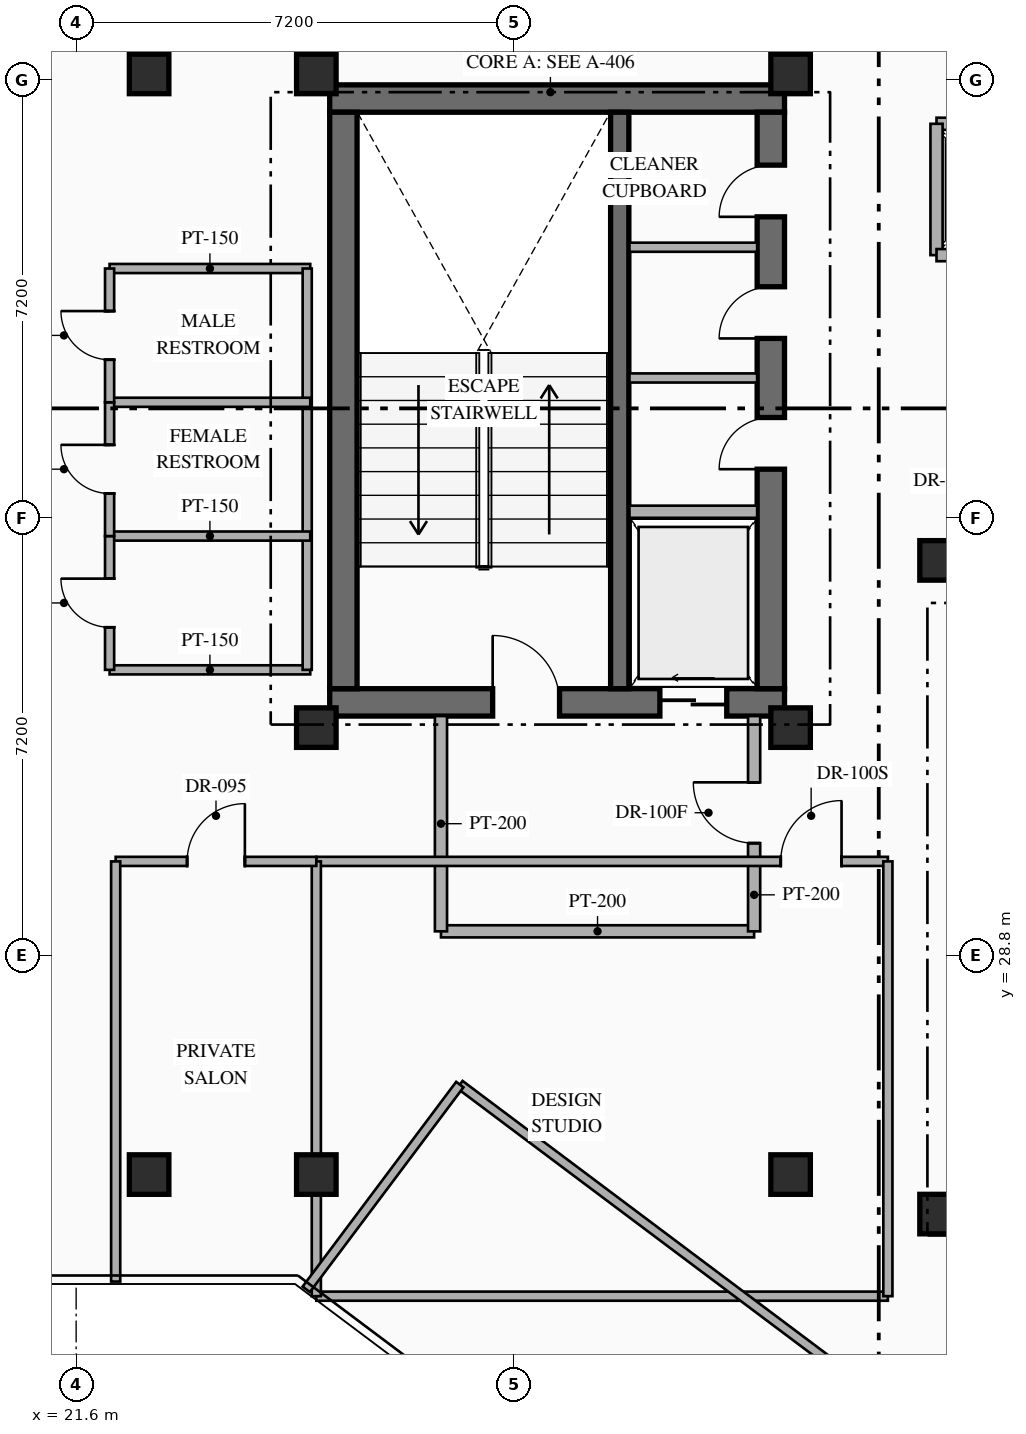
"""IFC4 building model, lengths in metres.
Left out: names, types, materials, properties, quantities, classifications, styles, units other than length and angle.
Written with IfcOpenShell. Run it as: python <this file> out.ifc"""

import sys

from ifc_helpers import new_model, si_unit, direction, frame, frame_2d, origin, origin_2d, place, context, subcontext, project, spatial, rectangle, hollow_rectangle, extrude, element, fill, save


model = new_model("IFC4")
c1 = context("Model", 3, precision=1e-05, world=origin(), true_north=direction((0.0, 1.0)))
c2 = subcontext(c1, "Body", "Model", "MODEL_VIEW")
j1 = project(units=[si_unit("LENGTHUNIT", "METRE"), si_unit("PLANEANGLEUNIT", "RADIAN")], contexts=[c1])
p1 = place(None, origin())
s1 = spatial("IfcSite", under=j1, at=p1, CompositionType="ELEMENT")
p2 = place(p1, origin())
s2 = spatial("IfcBuilding", under=s1, at=p2, CompositionType="ELEMENT")
p3 = place(p2, frame((0.0, 0.0, 250.35)))
s3 = spatial("IfcBuildingStorey", under=s2, at=p3, CompositionType="ELEMENT", Elevation=250.35)
p4 = place(p3, frame((25.77, 32.965, 0.0), z_axis=(0.0, 0.0, 1.0), x_axis=(1.0, 0.0, 0.0)))
e1 = element("IfcWall", 1, at=p4, inside=s3, PredefinedType="SHEAR", context=c2, shape_type="SweptSolid", body=[
    extrude(rectangle(XDim=7.48, YDim=0.45, at=frame_2d((3.74, 0.0))), origin(), (0.0, 0.0, 1.0), 3.6),
])
p5 = place(p4, frame((2.68, 0.0, 0.0)))
e2 = element("IfcOpeningElement", 2, at=p5, cuts=e1, PredefinedType="OPENING", context=c2, shape_type="SweptSolid", body=[
    extrude(rectangle(XDim=1.1, YDim=2.2, at=frame_2d((0.55, 1.1))), frame((0.0, 0.235, 0.0), z_axis=(0.0, -1.0, 0.0), x_axis=(1.0, 0.0, 0.0)), (0.0, 0.0, 1.0), 0.47),
])
p6 = place(p4, frame((5.43, 0.0, 0.0)))
e3 = element("IfcOpeningElement", 3, at=p6, cuts=e1, PredefinedType="OPENING", context=c2, shape_type="SweptSolid", body=[
    extrude(rectangle(XDim=1.1, YDim=2.15, at=frame_2d((0.55, 1.075))), frame((0.0, 0.235, 0.0), z_axis=(0.0, -1.0, 0.0), x_axis=(1.0, 0.0, 0.0)), (0.0, 0.0, 1.0), 0.47),
])
p7 = place(p3, frame((25.77, 42.895, 0.0), z_axis=(0.0, 0.0, 1.0), x_axis=(1.0, 0.0, 0.0)))
e4 = element("IfcWall", 4, at=p7, inside=s3, PredefinedType="SHEAR", context=c2, shape_type="SweptSolid", body=[
    extrude(rectangle(XDim=7.48, YDim=0.45, at=frame_2d((3.74, 0.0))), origin(), (0.0, 0.0, 1.0), 3.6),
])
p8 = place(p3, frame((25.995, 33.19, 0.0), z_axis=(0.0, 0.0, 1.0), x_axis=(0.0, 1.0, 0.0)))
e5 = element("IfcWall", 5, at=p8, inside=s3, PredefinedType="SHEAR", context=c2, shape_type="SweptSolid", body=[
    extrude(rectangle(XDim=9.48, YDim=0.45, at=frame_2d((4.74, 0.0))), origin(), (0.0, 0.0, 1.0), 3.6),
])
p9 = place(p3, frame((33.025, 33.19, 0.0), z_axis=(0.0, 0.0, 1.0), x_axis=(0.0, 1.0, 0.0)))
e6 = element("IfcWall", 6, at=p9, inside=s3, PredefinedType="SHEAR", context=c2, shape_type="SweptSolid", body=[
    extrude(rectangle(XDim=9.48, YDim=0.45, at=frame_2d((4.74, 0.0))), origin(), (0.0, 0.0, 1.0), 3.6),
])
p10 = place(p9, frame((3.61, 0.0, 0.0)))
e7 = element("IfcOpeningElement", 7, at=p10, cuts=e6, PredefinedType="OPENING", context=c2, shape_type="SweptSolid", body=[
    extrude(rectangle(XDim=0.85, YDim=2.08, at=frame_2d((0.425, 1.04))), frame((0.0, 0.235, 0.0), z_axis=(0.0, -1.0, 0.0), x_axis=(1.0, 0.0, 0.0)), (0.0, 0.0, 1.0), 0.47),
])
p11 = place(p9, frame((5.76, 0.0, 0.0)))
e8 = element("IfcOpeningElement", 8, at=p11, cuts=e6, PredefinedType="OPENING", context=c2, shape_type="SweptSolid", body=[
    extrude(rectangle(XDim=0.85, YDim=2.08, at=frame_2d((0.425, 1.04))), frame((0.0, 0.235, 0.0), z_axis=(0.0, -1.0, 0.0), x_axis=(1.0, 0.0, 0.0)), (0.0, 0.0, 1.0), 0.47),
])
p12 = place(p9, frame((7.76, 0.0, 0.0)))
e9 = element("IfcOpeningElement", 9, at=p12, cuts=e6, PredefinedType="OPENING", context=c2, shape_type="SweptSolid", body=[
    extrude(rectangle(XDim=0.85, YDim=2.08, at=frame_2d((0.425, 1.04))), frame((0.0, 0.235, 0.0), z_axis=(0.0, -1.0, 0.0), x_axis=(1.0, 0.0, 0.0)), (0.0, 0.0, 1.0), 0.47),
])
p13 = place(p3, frame((30.54, 33.19, 0.0), z_axis=(0.0, 0.0, 1.0), x_axis=(0.0, 1.0, 0.0)))
e10 = element("IfcWall", 10, at=p13, inside=s3, PredefinedType="SHEAR", context=c2, shape_type="SweptSolid", body=[
    extrude(rectangle(XDim=9.48, YDim=0.3, at=frame_2d((4.74, 0.0))), origin(), (0.0, 0.0, 1.0), 3.6),
])
for number, where, z_axis, x_axis in (
    (11, (25.55, 32.55, 0.0), (0.0, 0.0, 1.0), (1.0, 0.0, 0.0)),
    (12, (33.35, 32.55, 0.0), (0.0, 0.0, 1.0), (1.0, 0.0, 0.0)),
    (13, (25.55, 43.3, 0.0), (0.0, 0.0, 1.0), (1.0, 0.0, 0.0)),
    (14, (33.35, 43.3, 0.0), (0.0, 0.0, 1.0), (1.0, 0.0, 0.0)),
    (15, (35.8, 24.55, 0.0), (0.0, 0.0, 1.0), (1.0, 0.0, 0.0)),
    (16, (35.8, 35.3, 0.0), (0.0, 0.0, 1.0), (1.0, 0.0, 0.0)),
    (17, (25.55, 25.2, 0.0), (0.0, 0.0, 1.0), (1.0, 0.0, 0.0)),
    (18, (33.35, 25.2, 0.0), (0.0, 0.0, 1.0), (1.0, 0.0, 0.0)),
    (19, (22.8, 25.2, 0.0), (0.0, 0.0, 1.0), (1.0, 0.0, 0.0)),
    (20, (22.8, 43.3, 0.0), (0.0, 0.0, 1.0), (1.0, 0.0, 0.0)),
):
    element("IfcColumn", number, at=place(p3, frame(where, z_axis=z_axis, x_axis=x_axis)), inside=s3, PredefinedType="COLUMN", context=c2, shape_type="SweptSolid", body=[
        extrude(hollow_rectangle(XDim=0.65, YDim=0.65, WallThickness=0.025, at=origin_2d()), origin(), (0.0, 0.0, 1.0), 3.6),
    ])
p14 = place(p3, frame((30.7, 36.1, 0.0), z_axis=(0.0, 0.0, 1.0), x_axis=(1.0, 0.0, 0.0)))
e21 = element("IfcWall", 21, at=p14, inside=s3, PredefinedType="STANDARD", context=c2, shape_type="SweptSolid", body=[
    extrude(rectangle(XDim=2.1, YDim=0.2, at=frame_2d((1.05, 0.0))), origin(), (0.0, 0.0, 1.0), 3.35),
])
for number, where, z_axis, x_axis in (
    (22, (30.7, 38.3, 0.0), (0.0, 0.0, 1.0), (1.0, 0.0, 0.0)),
    (23, (30.7, 40.45, 0.0), (0.0, 0.0, 1.0), (1.0, 0.0, 0.0)),
):
    element("IfcWall", number, at=place(p3, frame(where, z_axis=z_axis, x_axis=x_axis)), inside=s3, PredefinedType="PARTITIONING", context=c2, shape_type="SweptSolid", body=[
        extrude(rectangle(XDim=2.1, YDim=0.15, at=frame_2d((1.05, 0.0))), origin(), (0.0, 0.0, 1.0), 3.35),
    ])
p15 = place(p3, frame((27.6, 29.2, 0.0), z_axis=(0.0, 0.0, 1.0), x_axis=(1.0, 0.0, 0.0)))
e24 = element("IfcWall", 24, at=p15, inside=s3, PredefinedType="STANDARD", context=c2, shape_type="SweptSolid", body=[
    extrude(rectangle(XDim=5.15, YDim=0.2, at=frame_2d((2.575, 0.0))), origin(), (0.0, 0.0, 1.0), 3.35),
])
p16 = place(p3, frame((27.6, 29.2, 0.0), z_axis=(0.0, 0.0, 1.0), x_axis=(0.0, 1.0, 0.0)))
e25 = element("IfcWall", 25, at=p16, inside=s3, PredefinedType="STANDARD", context=c2, shape_type="SweptSolid", body=[
    extrude(rectangle(XDim=3.54, YDim=0.2, at=frame_2d((1.77, 0.0))), origin(), (0.0, 0.0, 1.0), 3.35),
])
p17 = place(p3, frame((32.75, 29.2, 0.0), z_axis=(0.0, 0.0, 1.0), x_axis=(0.0, 1.0, 0.0)))
e26 = element("IfcWall", 26, at=p17, inside=s3, PredefinedType="STANDARD", context=c2, shape_type="SweptSolid", body=[
    extrude(rectangle(XDim=3.54, YDim=0.2, at=frame_2d((1.77, 0.0))), origin(), (0.0, 0.0, 1.0), 3.35),
])
p18 = place(p17, frame((1.45, 0.0, 0.0)))
e27 = element("IfcOpeningElement", 27, at=p18, cuts=e26, PredefinedType="OPENING", context=c2, shape_type="SweptSolid", body=[
    extrude(rectangle(XDim=1.0, YDim=2.2, at=frame_2d((0.5, 1.1))), frame((0.0, 0.11, 0.0), z_axis=(0.0, -1.0, 0.0), x_axis=(1.0, 0.0, 0.0)), (0.0, 0.0, 1.0), 0.22),
])
p19 = place(p3, frame((35.75, 42.48, 0.0), z_axis=(0.0, 0.0, 1.0), x_axis=(1.0, 0.0, 0.0)))
e28 = element("IfcWall", 28, at=p19, inside=s3, PredefinedType="STANDARD", context=c2, shape_type="SweptSolid", body=[
    extrude(rectangle(XDim=9.11, YDim=0.2, at=frame_2d((4.555, 0.0))), origin(), (0.0, 0.0, 1.0), 3.35),
])
p20 = place(p3, frame((35.75, 40.32, 0.0), z_axis=(0.0, 0.0, 1.0), x_axis=(0.0, 1.0, 0.0)))
e29 = element("IfcWall", 29, at=p20, inside=s3, PredefinedType="STANDARD", context=c2, shape_type="SweptSolid", body=[
    extrude(rectangle(XDim=2.16, YDim=0.2, at=frame_2d((1.08, 0.0))), origin(), (0.0, 0.0, 1.0), 3.35),
])
p21 = place(p3, frame((35.75, 40.32, 0.0), z_axis=(0.0, 0.0, 1.0), x_axis=(1.0, 0.0, 0.0)))
e30 = element("IfcWall", 30, at=p21, inside=s3, PredefinedType="STANDARD", context=c2, shape_type="SweptSolid", body=[
    extrude(rectangle(XDim=9.11, YDim=0.2, at=frame_2d((4.555, 0.0))), origin(), (0.0, 0.0, 1.0), 3.35),
])
p22 = place(p21, frame((0.53, 0.0, 0.0)))
e31 = element("IfcOpeningElement", 31, at=p22, cuts=e30, PredefinedType="OPENING", context=c2, shape_type="SweptSolid", body=[
    extrude(rectangle(XDim=1.1, YDim=2.18, at=frame_2d((0.55, 1.09))), frame((0.0, 0.11, 0.0), z_axis=(0.0, -1.0, 0.0), x_axis=(1.0, 0.0, 0.0)), (0.0, 0.0, 1.0), 0.22),
])
p23 = place(p21, frame((2.73, 0.0, 0.0)))
e32 = element("IfcOpeningElement", 32, at=p23, cuts=e30, PredefinedType="OPENING", context=c2, shape_type="SweptSolid", body=[
    extrude(rectangle(XDim=1.1, YDim=2.18, at=frame_2d((0.55, 1.09))), frame((0.0, 0.11, 0.0), z_axis=(0.0, -1.0, 0.0), x_axis=(1.0, 0.0, 0.0)), (0.0, 0.0, 1.0), 0.22),
])
p24 = place(p21, frame((4.93, 0.0, 0.0)))
e33 = element("IfcOpeningElement", 33, at=p24, cuts=e30, PredefinedType="OPENING", context=c2, shape_type="SweptSolid", body=[
    extrude(rectangle(XDim=1.1, YDim=2.18, at=frame_2d((0.55, 1.09))), frame((0.0, 0.11, 0.0), z_axis=(0.0, -1.0, 0.0), x_axis=(1.0, 0.0, 0.0)), (0.0, 0.0, 1.0), 0.22),
])
p25 = place(p21, frame((7.13, 0.0, 0.0)))
e34 = element("IfcOpeningElement", 34, at=p25, cuts=e30, PredefinedType="OPENING", context=c2, shape_type="SweptSolid", body=[
    extrude(rectangle(XDim=1.1, YDim=2.18, at=frame_2d((0.55, 1.09))), frame((0.0, 0.11, 0.0), z_axis=(0.0, -1.0, 0.0), x_axis=(1.0, 0.0, 0.0)), (0.0, 0.0, 1.0), 0.22),
])
for number, where, z_axis, x_axis in (
    (35, (22.15, 33.5, 0.0), (0.0, 0.0, 1.0), (1.0, 0.0, 0.0)),
    (36, (22.15, 40.1, 0.0), (0.0, 0.0, 1.0), (1.0, 0.0, 0.0)),
):
    element("IfcWall", number, at=place(p3, frame(where, z_axis=z_axis, x_axis=x_axis)), inside=s3, PredefinedType="PARTITIONING", context=c2, shape_type="SweptSolid", body=[
        extrude(rectangle(XDim=3.3, YDim=0.15, at=frame_2d((1.65, 0.0))), origin(), (0.0, 0.0, 1.0), 3.35),
    ])
p26 = place(p3, frame((25.4, 33.5, 0.0), z_axis=(0.0, 0.0, 1.0), x_axis=(0.0, 1.0, 0.0)))
e37 = element("IfcWall", 37, at=p26, inside=s3, PredefinedType="PARTITIONING", context=c2, shape_type="SweptSolid", body=[
    extrude(rectangle(XDim=6.6, YDim=0.15, at=frame_2d((3.3, 0.0))), origin(), (0.0, 0.0, 1.0), 3.35),
])
for number, where, z_axis, x_axis in (
    (38, (22.15, 35.7, 0.0), (0.0, 0.0, 1.0), (1.0, 0.0, 0.0)),
    (39, (22.15, 37.9, 0.0), (0.0, 0.0, 1.0), (1.0, 0.0, 0.0)),
):
    element("IfcWall", number, at=place(p3, frame(where, z_axis=z_axis, x_axis=x_axis)), inside=s3, PredefinedType="PARTITIONING", context=c2, shape_type="SweptSolid", body=[
        extrude(rectangle(XDim=3.3, YDim=0.15, at=frame_2d((1.65, 0.0))), origin(), (0.0, 0.0, 1.0), 3.35),
    ])
p27 = place(p3, frame((22.15, 33.5, 0.0), z_axis=(0.0, 0.0, 1.0), x_axis=(0.0, 1.0, 0.0)))
e40 = element("IfcWall", 40, at=p27, inside=s3, PredefinedType="PARTITIONING", context=c2, shape_type="SweptSolid", body=[
    extrude(rectangle(XDim=2.2, YDim=0.15, at=frame_2d((1.1, 0.0))), origin(), (0.0, 0.0, 1.0), 3.35),
])
p28 = place(p27, frame((0.7, 0.0, 0.0)))
e41 = element("IfcOpeningElement", 41, at=p28, cuts=e40, PredefinedType="OPENING", context=c2, shape_type="SweptSolid", body=[
    extrude(rectangle(XDim=0.8, YDim=2.06, at=frame_2d((0.4, 1.03))), frame((0.0, 0.085, 0.0), z_axis=(0.0, -1.0, 0.0), x_axis=(1.0, 0.0, 0.0)), (0.0, 0.0, 1.0), 0.17),
])
p29 = place(p3, frame((22.15, 35.7, 0.0), z_axis=(0.0, 0.0, 1.0), x_axis=(0.0, 1.0, 0.0)))
e42 = element("IfcWall", 42, at=p29, inside=s3, PredefinedType="PARTITIONING", context=c2, shape_type="SweptSolid", body=[
    extrude(rectangle(XDim=2.2, YDim=0.15, at=frame_2d((1.1, 0.0))), origin(), (0.0, 0.0, 1.0), 3.35),
])
p30 = place(p29, frame((0.7, 0.0, 0.0)))
e43 = element("IfcOpeningElement", 43, at=p30, cuts=e42, PredefinedType="OPENING", context=c2, shape_type="SweptSolid", body=[
    extrude(rectangle(XDim=0.8, YDim=2.06, at=frame_2d((0.4, 1.03))), frame((0.0, 0.085, 0.0), z_axis=(0.0, -1.0, 0.0), x_axis=(1.0, 0.0, 0.0)), (0.0, 0.0, 1.0), 0.17),
])
p31 = place(p3, frame((22.15, 37.9, 0.0), z_axis=(0.0, 0.0, 1.0), x_axis=(0.0, 1.0, 0.0)))
e44 = element("IfcWall", 44, at=p31, inside=s3, PredefinedType="PARTITIONING", context=c2, shape_type="SweptSolid", body=[
    extrude(rectangle(XDim=2.2, YDim=0.15, at=frame_2d((1.1, 0.0))), origin(), (0.0, 0.0, 1.0), 3.35),
])
p32 = place(p31, frame((0.7, 0.0, 0.0)))
e45 = element("IfcOpeningElement", 45, at=p32, cuts=e44, PredefinedType="OPENING", context=c2, shape_type="SweptSolid", body=[
    extrude(rectangle(XDim=0.8, YDim=2.06, at=frame_2d((0.4, 1.03))), frame((0.0, 0.085, 0.0), z_axis=(0.0, -1.0, 0.0), x_axis=(1.0, 0.0, 0.0)), (0.0, 0.0, 1.0), 0.17),
])
p33 = place(p3, frame((25.55, 23.2, 0.0), z_axis=(0.0, 0.0, 1.0), x_axis=(1.0, 0.0, 0.0)))
e46 = element("IfcWall", 46, at=p33, inside=s3, PredefinedType="PARTITIONING", context=c2, shape_type="SweptSolid", body=[
    extrude(rectangle(XDim=9.4, YDim=0.15, at=frame_2d((4.7, 0.0))), origin(), (0.0, 0.0, 1.0), 3.35),
])
p34 = place(p3, frame((25.55, 30.35, 0.0), z_axis=(0.0, 0.0, 1.0), x_axis=(1.0, 0.0, 0.0)))
e47 = element("IfcWall", 47, at=p34, inside=s3, PredefinedType="PARTITIONING", context=c2, shape_type="SweptSolid", body=[
    extrude(rectangle(XDim=9.4, YDim=0.15, at=frame_2d((4.7, 0.0))), origin(), (0.0, 0.0, 1.0), 3.35),
])
p35 = place(p34, frame((7.638, 0.0, 0.0)))
e48 = element("IfcOpeningElement", 48, at=p35, cuts=e47, PredefinedType="OPENING", context=c2, shape_type="SweptSolid", body=[
    extrude(rectangle(XDim=1.0, YDim=2.15, at=frame_2d((0.5, 1.075))), frame((0.0, 0.085, 0.0), z_axis=(0.0, -1.0, 0.0), x_axis=(1.0, 0.0, 0.0)), (0.0, 0.0, 1.0), 0.17),
])
p36 = place(p3, frame((25.55, 23.2, 0.0), z_axis=(0.0, 0.0, 1.0), x_axis=(0.0, 1.0, 0.0)))
e49 = element("IfcWall", 49, at=p36, inside=s3, PredefinedType="PARTITIONING", context=c2, shape_type="SweptSolid", body=[
    extrude(rectangle(XDim=7.15, YDim=0.15, at=frame_2d((3.575, 0.0))), origin(), (0.0, 0.0, 1.0), 2.757),
])
p37 = place(p3, frame((34.95, 23.2, 0.0), z_axis=(0.0, 0.0, 1.0), x_axis=(0.0, 1.0, 0.0)))
e50 = element("IfcWall", 50, at=p37, inside=s3, PredefinedType="PARTITIONING", context=c2, shape_type="SweptSolid", body=[
    extrude(rectangle(XDim=7.15, YDim=0.15, at=frame_2d((3.575, 0.0))), origin(), (0.0, 0.0, 1.0), 3.35),
])
p38 = place(p3, frame((22.25, 30.35, 0.0), z_axis=(0.0, 0.0, 1.0), x_axis=(1.0, 0.0, 0.0)))
e51 = element("IfcWall", 51, at=p38, inside=s3, PredefinedType="PARTITIONING", context=c2, shape_type="SweptSolid", body=[
    extrude(rectangle(XDim=3.3, YDim=0.15, at=frame_2d((1.65, 0.0))), origin(), (0.0, 0.0, 1.0), 3.35),
])
p39 = place(p38, frame((1.175, 0.0, 0.0)))
e52 = element("IfcOpeningElement", 52, at=p39, cuts=e51, PredefinedType="OPENING", context=c2, shape_type="SweptSolid", body=[
    extrude(rectangle(XDim=0.95, YDim=2.15, at=frame_2d((0.475, 1.075))), frame((0.0, 0.085, 0.0), z_axis=(0.0, -1.0, 0.0), x_axis=(1.0, 0.0, 0.0)), (0.0, 0.0, 1.0), 0.17),
])
p40 = place(p3, frame((22.25, 23.44, 0.0), z_axis=(0.0, 0.0, 1.0), x_axis=(0.0, 1.0, 0.0)))
e53 = element("IfcWall", 53, at=p40, inside=s3, PredefinedType="PARTITIONING", context=c2, shape_type="SweptSolid", body=[
    extrude(rectangle(XDim=6.91, YDim=0.15, at=frame_2d((3.455, 0.0))), origin(), (0.0, 0.0, 1.0), 3.35),
])
p41 = place(p3, frame((27.91, 26.68, 0.0), z_axis=(0.0, 0.0, 1.0), x_axis=(0.8, -0.6, 0.0)))
e54 = element("IfcWall", 54, at=p41, inside=s3, PredefinedType="PARTITIONING", context=c2, shape_type="SweptSolid", body=[
    extrude(rectangle(XDim=17.76, YDim=0.15, at=frame_2d((8.88, 0.0))), origin(), (0.0, 0.0, 1.0), 3.35),
])
p42 = place(p41, frame((11.294, 0.0, 0.0)))
e55 = element("IfcOpeningElement", 55, at=p42, cuts=e54, PredefinedType="OPENING", context=c2, shape_type="SweptSolid", body=[
    extrude(rectangle(XDim=0.95, YDim=2.15, at=frame_2d((0.475, 1.075))), frame((0.0, 0.085, 0.0), z_axis=(0.0, -1.0, 0.0), x_axis=(1.0, 0.0, 0.0)), (0.0, 0.0, 1.0), 0.17),
])
p43 = place(p3, frame((25.384, 23.312, 0.0), z_axis=(0.0, 0.0, 1.0), x_axis=(0.599990721155, 0.80000695905, 0.0)))
e56 = element("IfcWall", 56, at=p43, inside=s3, PredefinedType="PARTITIONING", context=c2, shape_type="SweptSolid", body=[
    extrude(rectangle(XDim=4.21, YDim=0.15, at=frame_2d((2.105, 0.0))), origin(), (0.0, 0.0, 1.0), 3.35),
])
p44 = place(p5, origin())
e57 = element("IfcDoor", 57, at=p44, inside=s3, OperationType="SINGLE_SWING_LEFT", PredefinedType="DOOR", context=c2, shape_type="SweptSolid", body=[
    extrude(rectangle(XDim=1.1, YDim=2.2, at=frame_2d((0.55, 1.1))), frame((0.0, 0.025, 0.0), z_axis=(0.0, -1.0, 0.0), x_axis=(1.0, 0.0, 0.0)), (0.0, 0.0, 1.0), 0.05),
])
fill(e2, e57)
p45 = place(p6, origin())
e58 = element("IfcDoor", 58, at=p45, inside=s3, OperationType="SLIDING_TO_LEFT", PredefinedType="USERDEFINED", context=c2, shape_type="SweptSolid", body=[
    extrude(rectangle(XDim=1.1, YDim=2.15, at=frame_2d((0.55, 1.075))), frame((0.0, 0.025, 0.0), z_axis=(0.0, -1.0, 0.0), x_axis=(1.0, 0.0, 0.0)), (0.0, 0.0, 1.0), 0.05),
])
fill(e3, e58)
p46 = place(p10, origin())
e59 = element("IfcDoor", 59, at=p46, inside=s3, OperationType="SINGLE_SWING_LEFT", PredefinedType="DOOR", context=c2, shape_type="SweptSolid", body=[
    extrude(rectangle(XDim=0.85, YDim=2.08, at=frame_2d((0.425, 1.04))), frame((0.0, 0.025, 0.0), z_axis=(0.0, -1.0, 0.0), x_axis=(1.0, 0.0, 0.0)), (0.0, 0.0, 1.0), 0.05),
])
fill(e7, e59)
p47 = place(p11, origin())
e60 = element("IfcDoor", 60, at=p47, inside=s3, OperationType="SINGLE_SWING_LEFT", PredefinedType="DOOR", context=c2, shape_type="SweptSolid", body=[
    extrude(rectangle(XDim=0.85, YDim=2.08, at=frame_2d((0.425, 1.04))), frame((0.0, 0.025, 0.0), z_axis=(0.0, -1.0, 0.0), x_axis=(1.0, 0.0, 0.0)), (0.0, 0.0, 1.0), 0.05),
])
fill(e8, e60)
p48 = place(p12, origin())
e61 = element("IfcDoor", 61, at=p48, inside=s3, OperationType="SINGLE_SWING_LEFT", PredefinedType="DOOR", context=c2, shape_type="SweptSolid", body=[
    extrude(rectangle(XDim=0.85, YDim=2.08, at=frame_2d((0.425, 1.04))), frame((0.0, 0.025, 0.0), z_axis=(0.0, -1.0, 0.0), x_axis=(1.0, 0.0, 0.0)), (0.0, 0.0, 1.0), 0.05),
])
fill(e9, e61)
p49 = place(p18, origin())
e62 = element("IfcDoor", 62, at=p49, inside=s3, OperationType="SINGLE_SWING_RIGHT", PredefinedType="DOOR", context=c2, shape_type="SweptSolid", body=[
    extrude(rectangle(XDim=1.0, YDim=2.2, at=frame_2d((0.5, 1.1))), frame((0.0, 0.025, 0.0), z_axis=(0.0, -1.0, 0.0), x_axis=(1.0, 0.0, 0.0)), (0.0, 0.0, 1.0), 0.05),
])
fill(e27, e62)
p50 = place(p28, origin())
e63 = element("IfcDoor", 63, at=p50, inside=s3, OperationType="SINGLE_SWING_RIGHT", PredefinedType="DOOR", context=c2, shape_type="SweptSolid", body=[
    extrude(rectangle(XDim=0.8, YDim=2.06, at=frame_2d((0.4, 1.03))), frame((0.0, 0.025, 0.0), z_axis=(0.0, -1.0, 0.0), x_axis=(1.0, 0.0, 0.0)), (0.0, 0.0, 1.0), 0.05),
])
fill(e41, e63)
p51 = place(p30, origin())
e64 = element("IfcDoor", 64, at=p51, inside=s3, OperationType="SINGLE_SWING_RIGHT", PredefinedType="DOOR", context=c2, shape_type="SweptSolid", body=[
    extrude(rectangle(XDim=0.8, YDim=2.06, at=frame_2d((0.4, 1.03))), frame((0.0, 0.025, 0.0), z_axis=(0.0, -1.0, 0.0), x_axis=(1.0, 0.0, 0.0)), (0.0, 0.0, 1.0), 0.05),
])
fill(e43, e64)
p52 = place(p32, origin())
e65 = element("IfcDoor", 65, at=p52, inside=s3, OperationType="SINGLE_SWING_RIGHT", PredefinedType="DOOR", context=c2, shape_type="SweptSolid", body=[
    extrude(rectangle(XDim=0.8, YDim=2.06, at=frame_2d((0.4, 1.03))), frame((0.0, 0.025, 0.0), z_axis=(0.0, -1.0, 0.0), x_axis=(1.0, 0.0, 0.0)), (0.0, 0.0, 1.0), 0.05),
])
fill(e45, e65)
p53 = place(p35, origin())
e66 = element("IfcDoor", 66, at=p53, inside=s3, OperationType="SINGLE_SWING_RIGHT", PredefinedType="DOOR", context=c2, shape_type="SweptSolid", body=[
    extrude(rectangle(XDim=1.0, YDim=2.15, at=frame_2d((0.5, 1.075))), frame((0.0, 0.025, 0.0), z_axis=(0.0, -1.0, 0.0), x_axis=(1.0, 0.0, 0.0)), (0.0, 0.0, 1.0), 0.05),
])
fill(e48, e66)
p54 = place(p39, origin())
e67 = element("IfcDoor", 67, at=p54, inside=s3, OperationType="SINGLE_SWING_RIGHT", PredefinedType="DOOR", context=c2, shape_type="SweptSolid", body=[
    extrude(rectangle(XDim=0.95, YDim=2.15, at=frame_2d((0.475, 1.075))), frame((0.0, 0.025, 0.0), z_axis=(0.0, -1.0, 0.0), x_axis=(1.0, 0.0, 0.0)), (0.0, 0.0, 1.0), 0.05),
])
fill(e52, e67)
save(model, sys.argv[1])
